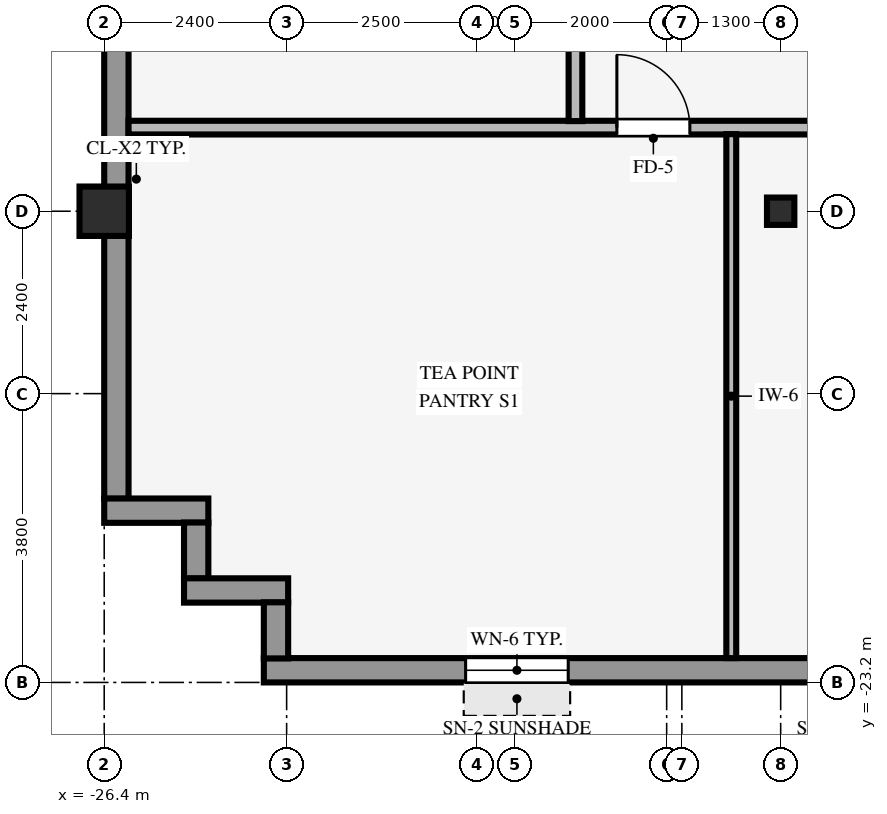
"""IFC4 building model, lengths in metres.
Left out: names, types, materials, properties, quantities, classifications, styles, units other than length and angle.
Written with IfcOpenShell. Run it as: python <this file> out.ifc"""

import sys

from ifc_helpers import new_model, si_unit, direction, frame, frame_2d, origin, origin_2d, place, context, subcontext, project, spatial, rectangle, hollow_rectangle, i_section, extrude, source, transform, mapped, element, fill, save


model = new_model("IFC4")
c1 = context("Model", 3, precision=1e-05, world=origin(), true_north=direction((0.0, 1.0)))
c2 = subcontext(c1, "Body", "Model", "MODEL_VIEW")
j1 = project(units=[si_unit("LENGTHUNIT", "METRE"), si_unit("PLANEANGLEUNIT", "RADIAN")], contexts=[c1])
p1 = place(None, origin())
s1 = spatial("IfcSite", under=j1, at=p1, CompositionType="ELEMENT")
p2 = place(p1, origin())
s2 = spatial("IfcBuilding", under=s1, at=p2, CompositionType="ELEMENT")
p3 = place(p2, frame((0.0, 0.0, 149.4)))
s3 = spatial("IfcBuildingStorey", under=s2, at=p3, CompositionType="ELEMENT", Elevation=149.4)
p4 = place(p3, frame((-26.4, -17.0, 0.0), z_axis=(0.0, 0.0, 1.0), x_axis=(1.0, 0.0, 0.0)))
e1 = element("IfcColumn", 1, at=p4, inside=s3, PredefinedType="COLUMN", context=c2, shape_type="SweptSolid", body=[
    extrude(hollow_rectangle(XDim=0.65, YDim=0.65, WallThickness=0.04, InnerFilletRadius=0.04, OuterFilletRadius=0.08, at=origin_2d()), origin(), (0.0, 0.0, 1.0), 3.37),
])
p5 = place(p3, frame((-17.5, -17.0, 0.0), z_axis=(0.0, 0.0, 1.0), x_axis=(1.0, 0.0, 0.0)))
e2 = element("IfcColumn", 2, at=p5, inside=s3, PredefinedType="COLUMN", context=c2, shape_type="SweptSolid", body=[
    extrude(i_section(OverallWidth=0.36, OverallDepth=0.36, WebThickness=0.021, FlangeThickness=0.021, FilletRadius=0.018, at=origin_2d()), origin(), (0.0, 0.0, 1.0), 3.37),
])
p6 = place(p3, frame((-24.3, -23.04, 0.0), z_axis=(0.0, 0.0, 1.0), x_axis=(1.0, 0.0, 0.0)))
e3 = element("IfcWall", 3, at=p6, inside=s3, PredefinedType="STANDARD", context=c2, shape_type="SweptSolid", body=[
    extrude(rectangle(XDim=48.6, YDim=0.32, at=frame_2d((24.3, 0.0))), origin(), (0.0, 0.0, 1.0), 2.705),
])
p7 = place(p6, frame((19.95, 0.0, 0.0), z_axis=(0.0, 0.0, 1.0), x_axis=(-1.0, 0.0, 0.0)))
e4 = element("IfcOpeningElement", 4, at=p7, cuts=e3, PredefinedType="OPENING", context=c2, shape_type="SweptSolid", body=[
    extrude(rectangle(XDim=1.05, YDim=2.1, at=frame_2d((0.525, 1.05))), frame((0.0, 0.17, 0.0), z_axis=(0.0, -1.0, 0.0), x_axis=(1.0, 0.0, 0.0)), (0.0, 0.0, 1.0), 0.34),
])
p8 = place(p6, frame((2.655, 0.0, 0.8)))
e5 = element("IfcOpeningElement", 5, at=p8, cuts=e3, PredefinedType="OPENING", context=c2, shape_type="SweptSolid", body=[
    extrude(rectangle(XDim=1.35, YDim=1.56, at=frame_2d((0.675, 0.78))), frame((0.0, 0.17, 0.0), z_axis=(0.0, -1.0, 0.0), x_axis=(1.0, 0.0, 0.0)), (0.0, 0.0, 1.0), 0.34),
])
p9 = place(p6, frame((7.315, 0.0, 0.8)))
e6 = element("IfcOpeningElement", 6, at=p9, cuts=e3, PredefinedType="OPENING", context=c2, shape_type="SweptSolid", body=[
    extrude(rectangle(XDim=1.35, YDim=1.56, at=frame_2d((0.675, 0.78))), frame((0.0, 0.17, 0.0), z_axis=(0.0, -1.0, 0.0), x_axis=(1.0, 0.0, 0.0)), (0.0, 0.0, 1.0), 0.34),
])
p10 = place(p6, frame((11.975, 0.0, 0.8)))
e7 = element("IfcOpeningElement", 7, at=p10, cuts=e3, PredefinedType="OPENING", context=c2, shape_type="SweptSolid", body=[
    extrude(rectangle(XDim=1.35, YDim=1.56, at=frame_2d((0.675, 0.78))), frame((0.0, 0.17, 0.0), z_axis=(0.0, -1.0, 0.0), x_axis=(1.0, 0.0, 0.0)), (0.0, 0.0, 1.0), 0.34),
])
p11 = place(p6, frame((21.295, 0.0, 0.8)))
e8 = element("IfcOpeningElement", 8, at=p11, cuts=e3, PredefinedType="OPENING", context=c2, shape_type="SweptSolid", body=[
    extrude(rectangle(XDim=1.35, YDim=1.56, at=frame_2d((0.675, 0.78))), frame((0.0, 0.17, 0.0), z_axis=(0.0, -1.0, 0.0), x_axis=(1.0, 0.0, 0.0)), (0.0, 0.0, 1.0), 0.34),
])
p12 = place(p6, frame((25.955, 0.0, 0.8)))
e9 = element("IfcOpeningElement", 9, at=p12, cuts=e3, PredefinedType="OPENING", context=c2, shape_type="SweptSolid", body=[
    extrude(rectangle(XDim=1.35, YDim=1.56, at=frame_2d((0.675, 0.78))), frame((0.0, 0.17, 0.0), z_axis=(0.0, -1.0, 0.0), x_axis=(1.0, 0.0, 0.0)), (0.0, 0.0, 1.0), 0.34),
])
p13 = place(p6, frame((31.065, 0.0, 0.8)))
e10 = element("IfcOpeningElement", 10, at=p13, cuts=e3, PredefinedType="OPENING", context=c2, shape_type="SweptSolid", body=[
    extrude(rectangle(XDim=1.35, YDim=1.56, at=frame_2d((0.675, 0.78))), frame((0.0, 0.17, 0.0), z_axis=(0.0, -1.0, 0.0), x_axis=(1.0, 0.0, 0.0)), (0.0, 0.0, 1.0), 0.34),
])
p14 = place(p6, frame((35.275, 0.0, 0.8)))
e11 = element("IfcOpeningElement", 11, at=p14, cuts=e3, PredefinedType="OPENING", context=c2, shape_type="SweptSolid", body=[
    extrude(rectangle(XDim=1.35, YDim=1.56, at=frame_2d((0.675, 0.78))), frame((0.0, 0.17, 0.0), z_axis=(0.0, -1.0, 0.0), x_axis=(1.0, 0.0, 0.0)), (0.0, 0.0, 1.0), 0.34),
])
p15 = place(p6, frame((39.935, 0.0, 0.8)))
e12 = element("IfcOpeningElement", 12, at=p15, cuts=e3, PredefinedType="OPENING", context=c2, shape_type="SweptSolid", body=[
    extrude(rectangle(XDim=1.35, YDim=1.56, at=frame_2d((0.675, 0.78))), frame((0.0, 0.17, 0.0), z_axis=(0.0, -1.0, 0.0), x_axis=(1.0, 0.0, 0.0)), (0.0, 0.0, 1.0), 0.34),
])
p16 = place(p6, frame((44.595, 0.0, 0.8)))
e13 = element("IfcOpeningElement", 13, at=p16, cuts=e3, PredefinedType="OPENING", context=c2, shape_type="SweptSolid", body=[
    extrude(rectangle(XDim=1.35, YDim=1.56, at=frame_2d((0.675, 0.78))), frame((0.0, 0.17, 0.0), z_axis=(0.0, -1.0, 0.0), x_axis=(1.0, 0.0, 0.0)), (0.0, 0.0, 1.0), 0.34),
])
p17 = place(p3, frame((-26.24, -20.784, 0.0), z_axis=(0.0, 0.0, 1.0), x_axis=(0.0, 1.0, 0.0)))
e14 = element("IfcWall", 14, at=p17, inside=s3, PredefinedType="STANDARD", context=c2, shape_type="SweptSolid", body=[
    extrude(rectangle(XDim=41.568, YDim=0.32, at=frame_2d((20.784, 0.0))), origin(), (0.0, 0.0, 1.0), 2.705),
])
p18 = place(p17, frame((7.369, 0.0, 0.8)))
e15 = element("IfcOpeningElement", 15, at=p18, cuts=e14, PredefinedType="OPENING", context=c2, shape_type="SweptSolid", body=[
    extrude(rectangle(XDim=2.1, YDim=1.56, at=frame_2d((1.05, 0.78))), frame((0.0, 0.17, 0.0), z_axis=(0.0, -1.0, 0.0), x_axis=(1.0, 0.0, 0.0)), (0.0, 0.0, 1.0), 0.34),
])
p19 = place(p17, frame((12.315, 0.0, 0.8)))
e16 = element("IfcOpeningElement", 16, at=p19, cuts=e14, PredefinedType="OPENING", context=c2, shape_type="SweptSolid", body=[
    extrude(rectangle(XDim=2.1, YDim=1.56, at=frame_2d((1.05, 0.78))), frame((0.0, 0.17, 0.0), z_axis=(0.0, -1.0, 0.0), x_axis=(1.0, 0.0, 0.0)), (0.0, 0.0, 1.0), 0.34),
])
p20 = place(p17, frame((17.261, 0.0, 0.8)))
e17 = element("IfcOpeningElement", 17, at=p20, cuts=e14, PredefinedType="OPENING", context=c2, shape_type="SweptSolid", body=[
    extrude(rectangle(XDim=2.1, YDim=1.56, at=frame_2d((1.05, 0.78))), frame((0.0, 0.17, 0.0), z_axis=(0.0, -1.0, 0.0), x_axis=(1.0, 0.0, 0.0)), (0.0, 0.0, 1.0), 0.34),
])
p21 = place(p17, frame((22.207, 0.0, 0.8)))
e18 = element("IfcOpeningElement", 18, at=p21, cuts=e14, PredefinedType="OPENING", context=c2, shape_type="SweptSolid", body=[
    extrude(rectangle(XDim=2.1, YDim=1.56, at=frame_2d((1.05, 0.78))), frame((0.0, 0.17, 0.0), z_axis=(0.0, -1.0, 0.0), x_axis=(1.0, 0.0, 0.0)), (0.0, 0.0, 1.0), 0.34),
])
p22 = place(p17, frame((27.153, 0.0, 0.8)))
e19 = element("IfcOpeningElement", 19, at=p22, cuts=e14, PredefinedType="OPENING", context=c2, shape_type="SweptSolid", body=[
    extrude(rectangle(XDim=2.1, YDim=1.56, at=frame_2d((1.05, 0.78))), frame((0.0, 0.17, 0.0), z_axis=(0.0, -1.0, 0.0), x_axis=(1.0, 0.0, 0.0)), (0.0, 0.0, 1.0), 0.34),
])
p23 = place(p17, frame((32.099, 0.0, 0.8)))
e20 = element("IfcOpeningElement", 20, at=p23, cuts=e14, PredefinedType="OPENING", context=c2, shape_type="SweptSolid", body=[
    extrude(rectangle(XDim=2.1, YDim=1.56, at=frame_2d((1.05, 0.78))), frame((0.0, 0.17, 0.0), z_axis=(0.0, -1.0, 0.0), x_axis=(1.0, 0.0, 0.0)), (0.0, 0.0, 1.0), 0.34),
])
p24 = place(p3, frame((-26.4, -20.94, 0.0), z_axis=(0.0, 0.0, 1.0), x_axis=(1.0, 0.0, 0.0)))
e21 = element("IfcWall", 21, at=p24, inside=s3, PredefinedType="STANDARD", context=c2, shape_type="SweptSolid", body=[
    extrude(rectangle(XDim=1.37, YDim=0.32, at=frame_2d((0.685, 0.0))), origin(), (0.0, 0.0, 1.0), 3.36),
])
p25 = place(p3, frame((-25.19, -21.834, 0.0), z_axis=(0.0, 0.0, 1.0), x_axis=(0.0, 1.0, 0.0)))
e22 = element("IfcWall", 22, at=p25, inside=s3, PredefinedType="STANDARD", context=c2, shape_type="SweptSolid", body=[
    extrude(rectangle(XDim=0.738, YDim=0.32, at=frame_2d((0.369, 0.0))), origin(), (0.0, 0.0, 1.0), 3.36),
])
p26 = place(p3, frame((-25.35, -21.99, 0.0), z_axis=(0.0, 0.0, 1.0), x_axis=(1.0, 0.0, 0.0)))
e23 = element("IfcWall", 23, at=p26, inside=s3, PredefinedType="STANDARD", context=c2, shape_type="SweptSolid", body=[
    extrude(rectangle(XDim=1.37, YDim=0.32, at=frame_2d((0.685, 0.0))), origin(), (0.0, 0.0, 1.0), 3.36),
])
p27 = place(p3, frame((-24.14, -22.884, 0.0), z_axis=(0.0, 0.0, 1.0), x_axis=(0.0, 1.0, 0.0)))
e24 = element("IfcWall", 24, at=p27, inside=s3, PredefinedType="STANDARD", context=c2, shape_type="SweptSolid", body=[
    extrude(rectangle(XDim=0.738, YDim=0.32, at=frame_2d((0.369, 0.0))), origin(), (0.0, 0.0, 1.0), 3.36),
])
p28 = place(p3, frame((-26.08, -15.9, 0.0), z_axis=(0.0, 0.0, 1.0), x_axis=(1.0, 0.0, 0.0)))
e25 = element("IfcWall", 25, at=p28, inside=s3, PredefinedType="PARTITIONING", context=c2, shape_type="SweptSolid", body=[
    extrude(rectangle(XDim=52.16, YDim=0.18, at=frame_2d((26.08, 0.0))), origin(), (0.0, 0.0, 1.0), 3.36),
])
p29 = place(p28, frame((24.5, 0.0, 0.0)))
e26 = element("IfcOpeningElement", 26, at=p29, cuts=e25, PredefinedType="OPENING", context=c2, shape_type="SweptSolid", body=[
    extrude(rectangle(XDim=0.96, YDim=2.1, at=frame_2d((0.48, 1.05))), frame((0.0, 0.1, 0.0), z_axis=(0.0, -1.0, 0.0), x_axis=(1.0, 0.0, 0.0)), (0.0, 0.0, 1.0), 0.2),
])
p30 = place(p28, frame((40.5, 0.0, 0.0)))
e27 = element("IfcOpeningElement", 27, at=p30, cuts=e25, PredefinedType="OPENING", context=c2, shape_type="SweptSolid", body=[
    extrude(rectangle(XDim=0.96, YDim=2.1, at=frame_2d((0.48, 1.05))), frame((0.0, 0.1, 0.0), z_axis=(0.0, -1.0, 0.0), x_axis=(1.0, 0.0, 0.0)), (0.0, 0.0, 1.0), 0.2),
])
p31 = place(p28, frame((13.16, 0.0, 0.0)))
e28 = element("IfcOpeningElement", 28, at=p31, cuts=e25, PredefinedType="OPENING", context=c2, shape_type="SweptSolid", body=[
    extrude(rectangle(XDim=0.96, YDim=2.1, at=frame_2d((0.48, 1.05))), frame((0.0, 0.1, 0.0), z_axis=(0.0, -1.0, 0.0), x_axis=(1.0, 0.0, 0.0)), (0.0, 0.0, 1.0), 0.2),
])
p32 = place(p28, frame((6.425, 0.0, 0.0)))
e29 = element("IfcOpeningElement", 29, at=p32, cuts=e25, PredefinedType="OPENING", context=c2, shape_type="SweptSolid", body=[
    extrude(rectangle(XDim=0.96, YDim=2.1, at=frame_2d((0.48, 1.05))), frame((0.0, 0.1, 0.0), z_axis=(0.0, -1.0, 0.0), x_axis=(1.0, 0.0, 0.0)), (0.0, 0.0, 1.0), 0.2),
])
p33 = place(p3, frame((-20.2, -15.814, 0.0), z_axis=(0.0, 0.0, 1.0), x_axis=(0.0, 1.0, 0.0)))
e30 = element("IfcWall", 30, at=p33, inside=s3, PredefinedType="PARTITIONING", context=c2, shape_type="SweptSolid", body=[
    extrude(rectangle(XDim=31.628, YDim=0.18, at=frame_2d((15.814, 0.0))), origin(), (0.0, 0.0, 1.0), 3.36),
])
p34 = place(p33, frame((15.334, 0.0, 0.0)))
e31 = element("IfcOpeningElement", 31, at=p34, cuts=e30, PredefinedType="OPENING", context=c2, shape_type="SweptSolid", body=[
    extrude(rectangle(XDim=0.96, YDim=2.1, at=frame_2d((0.48, 1.05))), frame((0.0, 0.1, 0.0), z_axis=(0.0, -1.0, 0.0), x_axis=(1.0, 0.0, 0.0)), (0.0, 0.0, 1.0), 0.2),
])
p35 = place(p33, frame((5.834, 0.0, 0.0)))
e32 = element("IfcOpeningElement", 32, at=p35, cuts=e30, PredefinedType="OPENING", context=c2, shape_type="SweptSolid", body=[
    extrude(rectangle(XDim=0.96, YDim=2.1, at=frame_2d((0.48, 1.05))), frame((0.0, 0.1, 0.0), z_axis=(0.0, -1.0, 0.0), x_axis=(1.0, 0.0, 0.0)), (0.0, 0.0, 1.0), 0.2),
])
p36 = place(p33, frame((24.834, 0.0, 0.0)))
e33 = element("IfcOpeningElement", 33, at=p36, cuts=e30, PredefinedType="OPENING", context=c2, shape_type="SweptSolid", body=[
    extrude(rectangle(XDim=0.96, YDim=2.1, at=frame_2d((0.48, 1.05))), frame((0.0, 0.1, 0.0), z_axis=(0.0, -1.0, 0.0), x_axis=(1.0, 0.0, 0.0)), (0.0, 0.0, 1.0), 0.2),
])
p37 = place(p3, frame((-18.15, -22.88, 0.0), z_axis=(0.0, 0.0, 1.0), x_axis=(0.0, 1.0, 0.0)))
e34 = element("IfcWall", 34, at=p37, inside=s3, PredefinedType="PARTITIONING", context=c2, shape_type="SweptSolid", body=[
    extrude(rectangle(XDim=6.894, YDim=0.13, at=frame_2d((3.447, 0.0))), origin(), (0.0, 0.0, 1.0), 3.36),
])
m1 = source(origin(), c2, "Body", "SweptSolid", [
    extrude(rectangle(XDim=1.35, YDim=1.56, at=frame_2d((0.675, 0.78))), frame((0.0, 0.03, 0.0), z_axis=(0.0, -1.0, 0.0), x_axis=(1.0, 0.0, 0.0)), (0.0, 0.0, 1.0), 0.06),
])
p38 = place(p8, origin())
e35 = element("IfcWindow", 35, at=p38, inside=s3, PartitioningType="SINGLE_PANEL", PredefinedType="WINDOW", context=c2, shape_type="MappedRepresentation", body=[
    mapped(m1, transform((0.0, 0.0, 0.0), scale=1.0)),
])
fill(e5, e35)
m2 = source(origin(), c2, "Body", "SweptSolid", [
    extrude(rectangle(XDim=0.96, YDim=2.1, at=frame_2d((0.48, 1.05))), frame((0.0, 0.025, 0.0), z_axis=(0.0, -1.0, 0.0), x_axis=(1.0, 0.0, 0.0)), (0.0, 0.0, 1.0), 0.05),
])
p39 = place(p32, origin())
e36 = element("IfcDoor", 36, at=p39, inside=s3, OperationType="SINGLE_SWING_LEFT", PredefinedType="DOOR", context=c2, shape_type="MappedRepresentation", body=[
    mapped(m2, transform((0.0, 0.0, 0.0), scale=1.0)),
])
fill(e29, e36)
save(model, sys.argv[1])
